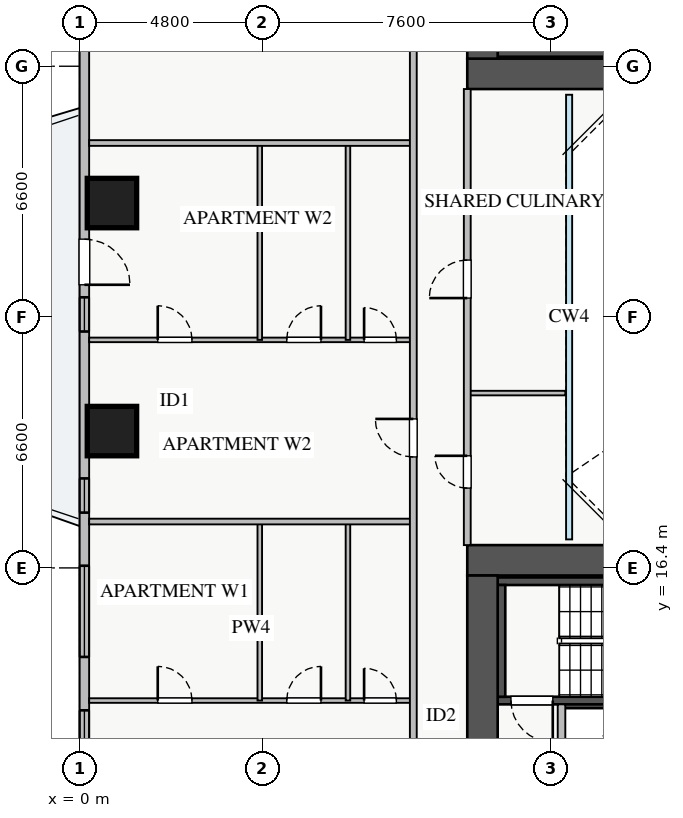
"""IFC4 building model, lengths in metres.
Left out: names, types, materials, properties, quantities, classifications, styles, units other than length and angle.
Written with IfcOpenShell. Run it as: python <this file> out.ifc"""

import sys

from ifc_helpers import new_model, si_unit, direction, frame, frame_2d, origin, origin_2d, place, context, subcontext, project, spatial, rectangle, extrude, source, transform, mapped, element, fill, save


model = new_model("IFC4")
c1 = context("Model", 3, precision=1e-05, world=origin(), true_north=direction((0.0, 1.0)))
c2 = subcontext(c1, "Body", "Model", "MODEL_VIEW")
j1 = project(units=[si_unit("LENGTHUNIT", "METRE"), si_unit("PLANEANGLEUNIT", "RADIAN")], contexts=[c1])
p1 = place(None, origin())
s1 = spatial("IfcSite", under=j1, at=p1, CompositionType="ELEMENT")
p2 = place(p1, origin())
s2 = spatial("IfcBuilding", under=s1, at=p2, CompositionType="ELEMENT")
p3 = place(p2, frame((0.0, 0.0, 73.0)))
s3 = spatial("IfcBuildingStorey", under=s2, at=p3, CompositionType="ELEMENT", Elevation=73.0)
p4 = place(p3, frame((12.68, 12.8, 0.0), z_axis=(0.0, 0.0, 1.0), x_axis=(1.0, 0.0, 0.0)))
e1 = element("IfcWall", 1, at=p4, inside=s3, PredefinedType="SHEAR", context=c2, shape_type="SweptSolid", body=[
    extrude(rectangle(XDim=1.94, YDim=0.18, at=frame_2d((0.97, 0.0))), origin(), (0.0, 0.0, 1.0), 3.07),
])
p5 = place(p3, frame((11.0, 29.95, 0.0), z_axis=(0.0, 0.0, 1.0), x_axis=(1.0, 0.0, 0.0)))
e2 = element("IfcWall", 2, at=p5, inside=s3, PredefinedType="SHEAR", context=c2, shape_type="SweptSolid", body=[
    extrude(rectangle(XDim=7.15, YDim=0.2, at=frame_2d((3.575, 0.0))), origin(), (0.0, 0.0, 1.0), 3.25),
])
p6 = place(p3, frame((11.0, 12.91, 0.0), z_axis=(0.0, 0.0, 1.0), x_axis=(1.0, 0.0, 0.0)))
e3 = element("IfcWall", 3, at=p6, inside=s3, PredefinedType="SHEAR", context=c2, shape_type="SweptSolid", body=[
    extrude(rectangle(XDim=7.15, YDim=0.2, at=frame_2d((3.575, 0.0))), origin(), (0.0, 0.0, 1.0), 3.25),
])
p7 = place(p6, frame((0.35, 0.0, 0.0)))
e4 = element("IfcOpeningElement", 4, at=p7, cuts=e3, PredefinedType="OPENING", context=c2, shape_type="SweptSolid", body=[
    extrude(rectangle(XDim=1.1, YDim=2.05, at=frame_2d((0.55, 1.025))), frame((0.0, 0.11, 0.0), z_axis=(0.0, -1.0, 0.0), x_axis=(1.0, 0.0, 0.0)), (0.0, 0.0, 1.0), 0.22),
])
p8 = place(p3, frame((11.0, 16.05, 0.0), z_axis=(0.0, 0.0, 1.0), x_axis=(1.0, 0.0, 0.0)))
e5 = element("IfcWall", 5, at=p8, inside=s3, PredefinedType="SHEAR", context=c2, shape_type="SweptSolid", body=[
    extrude(rectangle(XDim=7.15, YDim=0.2, at=frame_2d((3.575, 0.0))), origin(), (0.0, 0.0, 1.0), 3.25),
])
p9 = place(p3, frame((11.1, 13.01, 0.0), z_axis=(0.0, 0.0, 1.0), x_axis=(0.0, 1.0, 0.0)))
e6 = element("IfcWall", 6, at=p9, inside=s3, PredefinedType="SHEAR", context=c2, shape_type="SweptSolid", body=[
    extrude(rectangle(XDim=2.94, YDim=0.2, at=frame_2d((1.47, 0.0))), origin(), (0.0, 0.0, 1.0), 3.25),
])
p10 = place(p3, frame((10.2, 29.4, 0.0), z_axis=(0.0, 0.0, 1.0), x_axis=(1.0, 0.0, 0.0)))
e7 = element("IfcWall", 7, at=p10, inside=s3, PredefinedType="SHEAR", context=c2, shape_type="SweptSolid", body=[
    extrude(rectangle(XDim=17.6, YDim=0.8, at=frame_2d((8.8, 0.0))), origin(), (0.0, 0.0, 1.0), 3.25),
])
p11 = place(p3, frame((10.6, 29.8, 0.0), z_axis=(0.0, 0.0, 1.0), x_axis=(0.0, 1.0, 0.0)))
e8 = element("IfcWall", 8, at=p11, inside=s3, PredefinedType="SHEAR", context=c2, shape_type="SweptSolid", body=[
    extrude(rectangle(XDim=5.6, YDim=0.8, at=frame_2d((2.8, 0.0))), origin(), (0.0, 0.0, 1.0), 3.25),
])
p12 = place(p3, frame((10.2, 16.6, 0.0), z_axis=(0.0, 0.0, 1.0), x_axis=(1.0, 0.0, 0.0)))
e9 = element("IfcWall", 9, at=p12, inside=s3, PredefinedType="SHEAR", context=c2, shape_type="SweptSolid", body=[
    extrude(rectangle(XDim=17.6, YDim=0.8, at=frame_2d((8.8, 0.0))), origin(), (0.0, 0.0, 1.0), 3.25),
])
p13 = place(p3, frame((10.6, 10.6, 0.0), z_axis=(0.0, 0.0, 1.0), x_axis=(0.0, 1.0, 0.0)))
e10 = element("IfcWall", 10, at=p13, inside=s3, PredefinedType="SHEAR", context=c2, shape_type="SweptSolid", body=[
    extrude(rectangle(XDim=5.6, YDim=0.8, at=frame_2d((2.8, 0.0))), origin(), (0.0, 0.0, 1.0), 3.25),
])
m1 = source(origin(), c2, "Body", "SweptSolid", [
    extrude(rectangle(XDim=1.3, YDim=1.3, at=origin_2d()), origin(), (0.0, 0.0, 1.0), 3.25),
])
for number, where, z_axis, x_axis in (
    (11, (0.85, 26.0, 0.0), (0.0, 0.0, 1.0), (1.0, 0.0, 0.0)),
    (12, (0.85, 20.0, 0.0), (0.0, 0.0, 1.0), (1.0, 0.0, 0.0)),
):
    element("IfcColumn", number, at=place(p3, frame(where, z_axis=z_axis, x_axis=x_axis)), inside=s3, PredefinedType="COLUMN", context=c2, shape_type="MappedRepresentation", body=[
        mapped(m1, transform((0.0, 0.0, 0.0), x_axis=(1.0, 0.0, 0.0), y_axis=(0.0, 1.0, 0.0), z_axis=(0.0, 0.0, 1.0), scale=1.0)),
    ])
p14 = place(p3, frame((0.125, 9.45, 0.0), z_axis=(0.0, 0.0, 1.0), x_axis=(0.0, 1.0, 0.0)))
e13 = element("IfcWall", 13, at=p14, inside=s3, PredefinedType="STANDARD", context=c2, shape_type="SweptSolid", body=[
    extrude(rectangle(XDim=27.1, YDim=0.25, at=frame_2d((13.55, 0.0))), origin(), (0.0, 0.0, 1.0), 2.61),
])
p15 = place(p14, frame((14.4, 0.0, 0.0)))
e14 = element("IfcOpeningElement", 14, at=p15, cuts=e13, PredefinedType="OPENING", context=c2, shape_type="SweptSolid", body=[
    extrude(rectangle(XDim=1.2, YDim=2.1, at=frame_2d((0.6, 1.05))), frame((0.0, 0.135, 0.0), z_axis=(0.0, -1.0, 0.0), x_axis=(1.0, 0.0, 0.0)), (0.0, 0.0, 1.0), 0.27),
])
p16 = place(p14, frame((1.403, 0.0, 0.9)))
e15 = element("IfcOpeningElement", 15, at=p16, cuts=e13, PredefinedType="OPENING", context=c2, shape_type="SweptSolid", body=[
    extrude(rectangle(XDim=1.8, YDim=1.5, at=frame_2d((0.9, 0.75))), frame((0.0, 0.135, 0.0), z_axis=(0.0, -1.0, 0.0), x_axis=(1.0, 0.0, 0.0)), (0.0, 0.0, 1.0), 0.27),
])
p17 = place(p14, frame((22.663, 0.0, 0.9)))
e16 = element("IfcOpeningElement", 16, at=p17, cuts=e13, PredefinedType="OPENING", context=c2, shape_type="SweptSolid", body=[
    extrude(rectangle(XDim=2.1, YDim=1.48, at=frame_2d((1.05, 0.74))), frame((0.0, 0.135, 0.0), z_axis=(0.0, -1.0, 0.0), x_axis=(1.0, 0.0, 0.0)), (0.0, 0.0, 1.0), 0.27),
])
p18 = place(p14, frame((4.607, 0.0, 0.9)))
e17 = element("IfcOpeningElement", 17, at=p18, cuts=e13, PredefinedType="OPENING", context=c2, shape_type="SweptSolid", body=[
    extrude(rectangle(XDim=2.4, YDim=1.5, at=frame_2d((1.2, 0.75))), frame((0.0, 0.135, 0.0), z_axis=(0.0, -1.0, 0.0), x_axis=(1.0, 0.0, 0.0)), (0.0, 0.0, 1.0), 0.27),
])
p19 = place(p14, frame((13.17, 0.0, 0.9)))
e18 = element("IfcOpeningElement", 18, at=p19, cuts=e13, PredefinedType="OPENING", context=c2, shape_type="SweptSolid", body=[
    extrude(rectangle(XDim=0.9, YDim=1.2, at=frame_2d((0.45, 0.6))), frame((0.0, 0.135, 0.0), z_axis=(0.0, -1.0, 0.0), x_axis=(1.0, 0.0, 0.0)), (0.0, 0.0, 1.0), 0.27),
])
p20 = place(p14, frame((8.405, 0.0, 0.9)))
e19 = element("IfcOpeningElement", 19, at=p20, cuts=e13, PredefinedType="OPENING", context=c2, shape_type="SweptSolid", body=[
    extrude(rectangle(XDim=0.9, YDim=1.2, at=frame_2d((0.45, 0.6))), frame((0.0, 0.135, 0.0), z_axis=(0.0, -1.0, 0.0), x_axis=(1.0, 0.0, 0.0)), (0.0, 0.0, 1.0), 0.27),
])
p21 = place(p3, frame((12.68, 10.6, 0.0), z_axis=(0.0, 0.0, 1.0), x_axis=(0.0, 1.0, 0.0)))
e20 = element("IfcWall", 20, at=p21, inside=s3, PredefinedType="PARTITIONING", context=c2, shape_type="SweptSolid", body=[
    extrude(rectangle(XDim=2.21, YDim=0.2, at=frame_2d((1.105, 0.0))), origin(), (0.0, 0.0, 1.0), 3.07),
])
p22 = place(p3, frame((0.25, 12.91, 0.0), z_axis=(0.0, 0.0, 1.0), x_axis=(1.0, 0.0, 0.0)))
e21 = element("IfcWall", 21, at=p22, inside=s3, PredefinedType="PLUMBINGWALL", context=c2, shape_type="SweptSolid", body=[
    extrude(rectangle(XDim=8.53, YDim=0.12, at=frame_2d((4.265, 0.0))), origin(), (0.0, 0.0, 1.0), 3.07),
])
p23 = place(p22, frame((1.805, 0.0, 0.0)))
e22 = element("IfcOpeningElement", 22, at=p23, cuts=e21, PredefinedType="OPENING", context=c2, shape_type="SweptSolid", body=[
    extrude(rectangle(XDim=0.9, YDim=2.05, at=frame_2d((0.45, 1.025))), frame((0.0, 0.07, 0.0), z_axis=(0.0, -1.0, 0.0), x_axis=(1.0, 0.0, 0.0)), (0.0, 0.0, 1.0), 0.14),
])
p24 = place(p22, frame((5.2, 0.0, 0.0)))
e23 = element("IfcOpeningElement", 23, at=p24, cuts=e21, PredefinedType="OPENING", context=c2, shape_type="SweptSolid", body=[
    extrude(rectangle(XDim=0.9, YDim=2.05, at=frame_2d((0.45, 1.025))), frame((0.0, 0.07, 0.0), z_axis=(0.0, -1.0, 0.0), x_axis=(1.0, 0.0, 0.0)), (0.0, 0.0, 1.0), 0.14),
])
p25 = place(p22, frame((7.235, 0.0, 0.0)))
e24 = element("IfcOpeningElement", 24, at=p25, cuts=e21, PredefinedType="OPENING", context=c2, shape_type="SweptSolid", body=[
    extrude(rectangle(XDim=0.85, YDim=2.05, at=frame_2d((0.425, 1.025))), frame((0.0, 0.07, 0.0), z_axis=(0.0, -1.0, 0.0), x_axis=(1.0, 0.0, 0.0)), (0.0, 0.0, 1.0), 0.14),
])
for number, where, z_axis, x_axis in (
    (25, (4.74, 12.91, 0.0), (0.0, 0.0, 1.0), (0.0, 1.0, 0.0)),
    (26, (7.06, 12.91, 0.0), (0.0, 0.0, 1.0), (0.0, 1.0, 0.0)),
):
    element("IfcWall", number, at=place(p3, frame(where, z_axis=z_axis, x_axis=x_axis)), inside=s3, PredefinedType="PLUMBINGWALL", context=c2, shape_type="SweptSolid", body=[
        extrude(rectangle(XDim=4.71, YDim=0.12, at=frame_2d((2.355, 0.0))), origin(), (0.0, 0.0, 1.0), 3.07),
    ])
p26 = place(p3, frame((0.25, 22.4, 0.0), z_axis=(0.0, 0.0, 1.0), x_axis=(1.0, 0.0, 0.0)))
e27 = element("IfcWall", 27, at=p26, inside=s3, PredefinedType="PLUMBINGWALL", context=c2, shape_type="SweptSolid", body=[
    extrude(rectangle(XDim=8.53, YDim=0.12, at=frame_2d((4.265, 0.0))), origin(), (0.0, 0.0, 1.0), 3.07),
])
p27 = place(p26, frame((1.805, 0.0, 0.0)))
e28 = element("IfcOpeningElement", 28, at=p27, cuts=e27, PredefinedType="OPENING", context=c2, shape_type="SweptSolid", body=[
    extrude(rectangle(XDim=0.9, YDim=2.05, at=frame_2d((0.45, 1.025))), frame((0.0, 0.07, 0.0), z_axis=(0.0, -1.0, 0.0), x_axis=(1.0, 0.0, 0.0)), (0.0, 0.0, 1.0), 0.14),
])
p28 = place(p26, frame((5.2, 0.0, 0.0)))
e29 = element("IfcOpeningElement", 29, at=p28, cuts=e27, PredefinedType="OPENING", context=c2, shape_type="SweptSolid", body=[
    extrude(rectangle(XDim=0.9, YDim=2.05, at=frame_2d((0.45, 1.025))), frame((0.0, 0.07, 0.0), z_axis=(0.0, -1.0, 0.0), x_axis=(1.0, 0.0, 0.0)), (0.0, 0.0, 1.0), 0.14),
])
p29 = place(p26, frame((7.235, 0.0, 0.0)))
e30 = element("IfcOpeningElement", 30, at=p29, cuts=e27, PredefinedType="OPENING", context=c2, shape_type="SweptSolid", body=[
    extrude(rectangle(XDim=0.85, YDim=2.05, at=frame_2d((0.425, 1.025))), frame((0.0, 0.07, 0.0), z_axis=(0.0, -1.0, 0.0), x_axis=(1.0, 0.0, 0.0)), (0.0, 0.0, 1.0), 0.14),
])
for number, where, z_axis, x_axis in (
    (31, (4.74, 22.4, 0.0), (0.0, 0.0, 1.0), (0.0, 1.0, 0.0)),
    (32, (7.06, 22.4, 0.0), (0.0, 0.0, 1.0), (0.0, 1.0, 0.0)),
):
    element("IfcWall", number, at=place(p3, frame(where, z_axis=z_axis, x_axis=x_axis)), inside=s3, PredefinedType="PLUMBINGWALL", context=c2, shape_type="SweptSolid", body=[
        extrude(rectangle(XDim=5.18, YDim=0.12, at=frame_2d((2.59, 0.0))), origin(), (0.0, 0.0, 1.0), 3.07),
    ])
for number, where, z_axis, x_axis in (
    (33, (0.25, 17.62, 0.0), (0.0, 0.0, 1.0), (1.0, 0.0, 0.0)),
    (34, (0.25, 27.58, 0.0), (0.0, 0.0, 1.0), (1.0, 0.0, 0.0)),
):
    element("IfcWall", number, at=place(p3, frame(where, z_axis=z_axis, x_axis=x_axis)), inside=s3, PredefinedType="PARTITIONING", context=c2, shape_type="SweptSolid", body=[
        extrude(rectangle(XDim=8.53, YDim=0.15, at=frame_2d((4.265, 0.0))), origin(), (0.0, 0.0, 1.0), 3.07),
    ])
p30 = place(p3, frame((8.78, 7.21, 0.0), z_axis=(0.0, 0.0, 1.0), x_axis=(0.0, 1.0, 0.0)))
e35 = element("IfcWall", 35, at=p30, inside=s3, PredefinedType="PARTITIONING", context=c2, shape_type="SweptSolid", body=[
    extrude(rectangle(XDim=31.23, YDim=0.18, at=frame_2d((15.615, 0.0))), origin(), (0.0, 0.0, 1.0), 3.07),
])
p31 = place(p30, frame((30.09, 0.0, 0.0)))
e36 = element("IfcOpeningElement", 36, at=p31, cuts=e35, PredefinedType="OPENING", context=c2, shape_type="SweptSolid", body=[
    extrude(rectangle(XDim=0.9, YDim=2.05, at=frame_2d((0.45, 1.025))), frame((0.0, 0.1, 0.0), z_axis=(0.0, -1.0, 0.0), x_axis=(1.0, 0.0, 0.0)), (0.0, 0.0, 1.0), 0.2),
])
p32 = place(p30, frame((0.24, 0.0, 0.0)))
e37 = element("IfcOpeningElement", 37, at=p32, cuts=e35, PredefinedType="OPENING", context=c2, shape_type="SweptSolid", body=[
    extrude(rectangle(XDim=0.9, YDim=2.05, at=frame_2d((0.45, 1.025))), frame((0.0, 0.1, 0.0), z_axis=(0.0, -1.0, 0.0), x_axis=(1.0, 0.0, 0.0)), (0.0, 0.0, 1.0), 0.2),
])
p33 = place(p30, frame((2.84, 0.0, 0.0)))
e38 = element("IfcOpeningElement", 38, at=p33, cuts=e35, PredefinedType="OPENING", context=c2, shape_type="SweptSolid", body=[
    extrude(rectangle(XDim=1.0, YDim=2.05, at=frame_2d((0.5, 1.025))), frame((0.0, 0.1, 0.0), z_axis=(0.0, -1.0, 0.0), x_axis=(1.0, 0.0, 0.0)), (0.0, 0.0, 1.0), 0.2),
])
p34 = place(p30, frame((12.11, 0.0, 0.0)))
e39 = element("IfcOpeningElement", 39, at=p34, cuts=e35, PredefinedType="OPENING", context=c2, shape_type="SweptSolid", body=[
    extrude(rectangle(XDim=1.0, YDim=2.05, at=frame_2d((0.5, 1.025))), frame((0.0, 0.1, 0.0), z_axis=(0.0, -1.0, 0.0), x_axis=(1.0, 0.0, 0.0)), (0.0, 0.0, 1.0), 0.2),
])
p35 = place(p30, frame((24.62, 0.0, 0.0)))
e40 = element("IfcOpeningElement", 40, at=p35, cuts=e35, PredefinedType="OPENING", context=c2, shape_type="SweptSolid", body=[
    extrude(rectangle(XDim=1.0, YDim=2.05, at=frame_2d((0.5, 1.025))), frame((0.0, 0.1, 0.0), z_axis=(0.0, -1.0, 0.0), x_axis=(1.0, 0.0, 0.0)), (0.0, 0.0, 1.0), 0.2),
])
p36 = place(p3, frame((10.2, 21.0, 0.0), z_axis=(0.0, 0.0, 1.0), x_axis=(1.0, 0.0, 0.0)))
e41 = element("IfcWall", 41, at=p36, inside=s3, PredefinedType="PLUMBINGWALL", context=c2, shape_type="SweptSolid", body=[
    extrude(rectangle(XDim=2.58, YDim=0.12, at=frame_2d((1.29, 0.0))), origin(), (0.0, 0.0, 1.0), 3.07),
])
p37 = place(p3, frame((10.2, 17.0, 0.0), z_axis=(0.0, 0.0, 1.0), x_axis=(0.0, 1.0, 0.0)))
e42 = element("IfcWall", 42, at=p37, inside=s3, PredefinedType="PARTITIONING", context=c2, shape_type="SweptSolid", body=[
    extrude(rectangle(XDim=12.0, YDim=0.18, at=frame_2d((6.0, 0.0))), origin(), (0.0, 0.0, 1.0), 3.07),
])
p38 = place(p37, frame((1.5, 0.0, 0.0)))
e43 = element("IfcOpeningElement", 43, at=p38, cuts=e42, PredefinedType="OPENING", context=c2, shape_type="SweptSolid", body=[
    extrude(rectangle(XDim=0.85, YDim=2.05, at=frame_2d((0.425, 1.025))), frame((0.0, 0.1, 0.0), z_axis=(0.0, -1.0, 0.0), x_axis=(1.0, 0.0, 0.0)), (0.0, 0.0, 1.0), 0.2),
])
p39 = place(p37, frame((6.5, 0.0, 0.0)))
e44 = element("IfcOpeningElement", 44, at=p39, cuts=e42, PredefinedType="OPENING", context=c2, shape_type="SweptSolid", body=[
    extrude(rectangle(XDim=1.0, YDim=2.05, at=frame_2d((0.5, 1.025))), frame((0.0, 0.1, 0.0), z_axis=(0.0, -1.0, 0.0), x_axis=(1.0, 0.0, 0.0)), (0.0, 0.0, 1.0), 0.2),
])
m2 = source(origin(), c2, "Body", "SweptSolid", [
    extrude(rectangle(XDim=1.2, YDim=2.1, at=frame_2d((0.6, 1.05))), frame((0.0, 0.025, 0.0), z_axis=(0.0, -1.0, 0.0), x_axis=(1.0, 0.0, 0.0)), (0.0, 0.0, 1.0), 0.05),
])
p40 = place(p15, frame((1.2, 0.0, 0.0), z_axis=(0.0, 0.0, 1.0), x_axis=(-1.0, 0.0, 0.0)))
e45 = element("IfcDoor", 45, at=p40, inside=s3, OperationType="SINGLE_SWING_LEFT", PredefinedType="DOOR", context=c2, shape_type="MappedRepresentation", body=[
    mapped(m2, transform((0.0, 0.0, 0.0), x_axis=(1.0, 0.0, 0.0), y_axis=(0.0, 1.0, 0.0), z_axis=(0.0, 0.0, 1.0), scale=1.0)),
])
fill(e14, e45)
m3 = source(origin(), c2, "Body", "SweptSolid", [
    extrude(rectangle(XDim=1.8, YDim=1.5, at=frame_2d((0.9, 0.75))), frame((0.0, 0.03, 0.0), z_axis=(0.0, -1.0, 0.0), x_axis=(1.0, 0.0, 0.0)), (0.0, 0.0, 1.0), 0.06),
])
p41 = place(p16, origin())
e46 = element("IfcWindow", 46, at=p41, inside=s3, PartitioningType="TRIPLE_PANEL_VERTICAL", PredefinedType="WINDOW", context=c2, shape_type="MappedRepresentation", body=[
    mapped(m3, transform((0.0, 0.0, 0.0), x_axis=(1.0, 0.0, 0.0), y_axis=(0.0, 1.0, 0.0), z_axis=(0.0, 0.0, 1.0), scale=1.0)),
])
fill(e15, e46)
m4 = source(origin(), c2, "Body", "SweptSolid", [
    extrude(rectangle(XDim=1.1, YDim=2.05, at=frame_2d((0.55, 1.025))), frame((0.0, 0.025, 0.0), z_axis=(0.0, -1.0, 0.0), x_axis=(1.0, 0.0, 0.0)), (0.0, 0.0, 1.0), 0.05),
])
p42 = place(p7, frame((1.1, 0.0, 0.0), z_axis=(0.0, 0.0, 1.0), x_axis=(-1.0, 0.0, 0.0)))
e47 = element("IfcDoor", 47, at=p42, inside=s3, OperationType="SINGLE_SWING_RIGHT", PredefinedType="DOOR", context=c2, shape_type="MappedRepresentation", body=[
    mapped(m4, transform((0.0, 0.0, 0.0), x_axis=(1.0, 0.0, 0.0), y_axis=(0.0, 1.0, 0.0), z_axis=(0.0, 0.0, 1.0), scale=1.0)),
])
fill(e4, e47)
m5 = source(origin(), c2, "Body", "SweptSolid", [
    extrude(rectangle(XDim=0.9, YDim=2.05, at=frame_2d((0.45, 1.025))), frame((0.0, 0.025, 0.0), z_axis=(0.0, -1.0, 0.0), x_axis=(1.0, 0.0, 0.0)), (0.0, 0.0, 1.0), 0.05),
])
p43 = place(p23, origin())
e48 = element("IfcDoor", 48, at=p43, inside=s3, OperationType="SINGLE_SWING_LEFT", PredefinedType="DOOR", context=c2, shape_type="MappedRepresentation", body=[
    mapped(m5, transform((0.0, 0.0, 0.0), x_axis=(1.0, 0.0, 0.0), y_axis=(0.0, 1.0, 0.0), z_axis=(0.0, 0.0, 1.0), scale=1.0)),
])
fill(e22, e48)
p44 = place(p24, origin())
e49 = element("IfcDoor", 49, at=p44, inside=s3, OperationType="SINGLE_SWING_RIGHT", PredefinedType="DOOR", context=c2, shape_type="MappedRepresentation", body=[
    mapped(m5, transform((0.0, 0.0, 0.0), x_axis=(1.0, 0.0, 0.0), y_axis=(0.0, 1.0, 0.0), z_axis=(0.0, 0.0, 1.0), scale=1.0)),
])
fill(e23, e49)
m6 = source(origin(), c2, "Body", "SweptSolid", [
    extrude(rectangle(XDim=0.85, YDim=2.05, at=frame_2d((0.425, 1.025))), frame((0.0, 0.025, 0.0), z_axis=(0.0, -1.0, 0.0), x_axis=(1.0, 0.0, 0.0)), (0.0, 0.0, 1.0), 0.05),
])
p45 = place(p25, origin())
e50 = element("IfcDoor", 50, at=p45, inside=s3, OperationType="SINGLE_SWING_LEFT", PredefinedType="DOOR", context=c2, shape_type="MappedRepresentation", body=[
    mapped(m6, transform((0.0, 0.0, 0.0), x_axis=(1.0, 0.0, 0.0), y_axis=(0.0, 1.0, 0.0), z_axis=(0.0, 0.0, 1.0), scale=1.0)),
])
fill(e24, e50)
p46 = place(p27, origin())
e51 = element("IfcDoor", 51, at=p46, inside=s3, OperationType="SINGLE_SWING_LEFT", PredefinedType="DOOR", context=c2, shape_type="MappedRepresentation", body=[
    mapped(m5, transform((0.0, 0.0, 0.0), x_axis=(1.0, 0.0, 0.0), y_axis=(0.0, 1.0, 0.0), z_axis=(0.0, 0.0, 1.0), scale=1.0)),
])
fill(e28, e51)
p47 = place(p28, origin())
e52 = element("IfcDoor", 52, at=p47, inside=s3, OperationType="SINGLE_SWING_RIGHT", PredefinedType="DOOR", context=c2, shape_type="MappedRepresentation", body=[
    mapped(m5, transform((0.0, 0.0, 0.0), x_axis=(1.0, 0.0, 0.0), y_axis=(0.0, 1.0, 0.0), z_axis=(0.0, 0.0, 1.0), scale=1.0)),
])
fill(e29, e52)
p48 = place(p29, origin())
e53 = element("IfcDoor", 53, at=p48, inside=s3, OperationType="SINGLE_SWING_LEFT", PredefinedType="DOOR", context=c2, shape_type="MappedRepresentation", body=[
    mapped(m6, transform((0.0, 0.0, 0.0), x_axis=(1.0, 0.0, 0.0), y_axis=(0.0, 1.0, 0.0), z_axis=(0.0, 0.0, 1.0), scale=1.0)),
])
fill(e30, e53)
m7 = source(origin(), c2, "Body", "SweptSolid", [
    extrude(rectangle(XDim=1.0, YDim=2.05, at=frame_2d((0.5, 1.025))), frame((0.0, 0.025, 0.0), z_axis=(0.0, -1.0, 0.0), x_axis=(1.0, 0.0, 0.0)), (0.0, 0.0, 1.0), 0.05),
])
p49 = place(p34, origin())
e54 = element("IfcDoor", 54, at=p49, inside=s3, OperationType="SINGLE_SWING_RIGHT", PredefinedType="DOOR", context=c2, shape_type="MappedRepresentation", body=[
    mapped(m7, transform((0.0, 0.0, 0.0), x_axis=(1.0, 0.0, 0.0), y_axis=(0.0, 1.0, 0.0), z_axis=(0.0, 0.0, 1.0), scale=1.0)),
])
fill(e39, e54)
p50 = place(p38, origin())
e55 = element("IfcDoor", 55, at=p50, inside=s3, OperationType="SINGLE_SWING_RIGHT", PredefinedType="DOOR", context=c2, shape_type="MappedRepresentation", body=[
    mapped(m6, transform((0.0, 0.0, 0.0), x_axis=(1.0, 0.0, 0.0), y_axis=(0.0, 1.0, 0.0), z_axis=(0.0, 0.0, 1.0), scale=1.0)),
])
fill(e43, e55)
p51 = place(p39, origin())
e56 = element("IfcDoor", 56, at=p51, inside=s3, OperationType="SINGLE_SWING_LEFT", PredefinedType="DOOR", context=c2, shape_type="MappedRepresentation", body=[
    mapped(m7, transform((0.0, 0.0, 0.0), x_axis=(1.0, 0.0, 0.0), y_axis=(0.0, 1.0, 0.0), z_axis=(0.0, 0.0, 1.0), scale=1.0)),
])
fill(e44, e56)
m8 = source(origin(), c2, "Body", "SweptSolid", [
    extrude(rectangle(XDim=2.4, YDim=1.5, at=frame_2d((1.2, 0.75))), frame((0.0, 0.03, 0.0), z_axis=(0.0, -1.0, 0.0), x_axis=(1.0, 0.0, 0.0)), (0.0, 0.0, 1.0), 0.06),
])
p52 = place(p18, origin())
e57 = element("IfcWindow", 57, at=p52, inside=s3, PartitioningType="TRIPLE_PANEL_VERTICAL", PredefinedType="WINDOW", context=c2, shape_type="MappedRepresentation", body=[
    mapped(m8, transform((0.0, 0.0, 0.0), x_axis=(1.0, 0.0, 0.0), y_axis=(0.0, 1.0, 0.0), z_axis=(0.0, 0.0, 1.0), scale=1.0)),
])
fill(e17, e57)
m9 = source(origin(), c2, "Body", "SweptSolid", [
    extrude(rectangle(XDim=0.9, YDim=1.2, at=frame_2d((0.45, 0.6))), frame((0.0, 0.03, 0.0), z_axis=(0.0, -1.0, 0.0), x_axis=(1.0, 0.0, 0.0)), (0.0, 0.0, 1.0), 0.06),
])
p53 = place(p19, origin())
e58 = element("IfcWindow", 58, at=p53, inside=s3, PartitioningType="SINGLE_PANEL", PredefinedType="WINDOW", context=c2, shape_type="MappedRepresentation", body=[
    mapped(m9, transform((0.0, 0.0, 0.0), x_axis=(1.0, 0.0, 0.0), y_axis=(0.0, 1.0, 0.0), z_axis=(0.0, 0.0, 1.0), scale=1.0)),
])
fill(e18, e58)
p54 = place(p20, origin())
e59 = element("IfcWindow", 59, at=p54, inside=s3, PartitioningType="SINGLE_PANEL", PredefinedType="WINDOW", context=c2, shape_type="MappedRepresentation", body=[
    mapped(m9, transform((0.0, 0.0, 0.0), x_axis=(1.0, 0.0, 0.0), y_axis=(0.0, 1.0, 0.0), z_axis=(0.0, 0.0, 1.0), scale=1.0)),
])
fill(e19, e59)
save(model, sys.argv[1])
